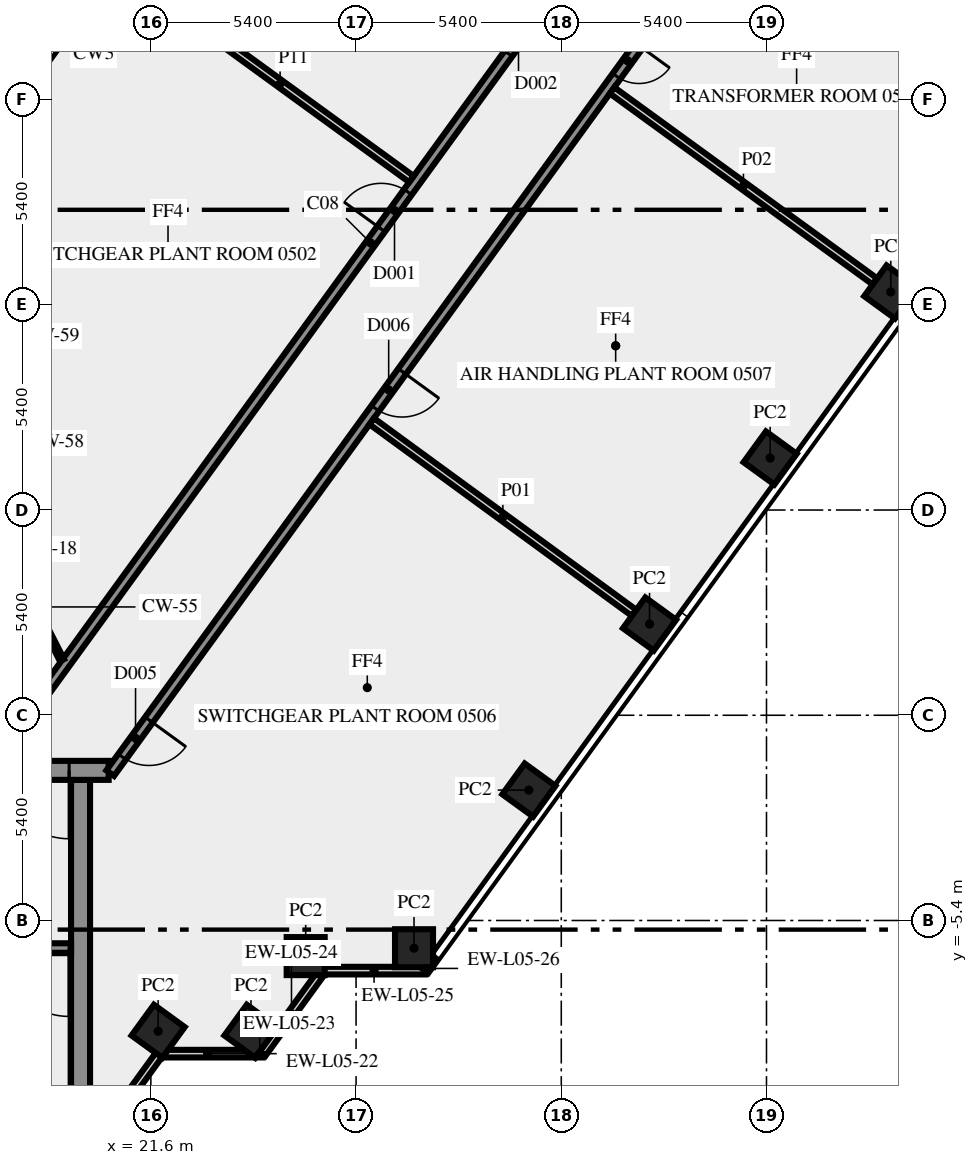
"""IFC4 building model, lengths in metres.
Left out: names, types, materials, properties, quantities, classifications, styles, units other than length and angle.
Written with IfcOpenShell. Run it as: python <this file> out.ifc"""

import sys

from ifc_helpers import new_model, si_unit, direction, frame, frame_2d, origin, origin_2d, place, context, subcontext, project, spatial, rectangle, extrude, element, fill, save


model = new_model("IFC4")
c1 = context("Model", 3, precision=1e-05, world=origin(), true_north=direction((0.0, 1.0)))
c2 = subcontext(c1, "Body", "Model", "MODEL_VIEW")
j1 = project(units=[si_unit("LENGTHUNIT", "METRE"), si_unit("PLANEANGLEUNIT", "RADIAN")], contexts=[c1])
p1 = place(None, origin())
s1 = spatial("IfcSite", under=j1, at=p1, CompositionType="ELEMENT")
p2 = place(p1, origin())
s2 = spatial("IfcBuilding", under=s1, at=p2, CompositionType="ELEMENT")
p3 = place(p2, frame((0.0, 0.0, 25.0)))
s3 = spatial("IfcBuildingStorey", under=s2, at=p3, CompositionType="ELEMENT", Elevation=25.0)
for number, where, z_axis, x_axis in (
    (1, (21.792, -8.315, 0.0), (0.0, 0.0, 1.0), (0.588, 0.809, 0.0)),
    (2, (24.235, -8.315, 0.0), (0.0, 0.0, 1.0), (0.588, 0.809, 0.0)),
    (3, (25.674, -6.337, 0.0), (0.0, 0.0, 1.0), (1.0, 0.0, 0.0)),
    (4, (28.525, -6.13, 0.0), (0.0, 0.0, 1.0), (1.0, 0.0, 0.0)),
    (5, (31.548, -1.969, 0.0), (0.0, 0.0, 1.0), (0.588, 0.809, 0.0)),
    (6, (34.722, 2.4, 0.0), (0.0, 0.0, 1.0), (0.588, 0.809, 0.0)),
    (7, (37.896, 6.769, 0.0), (0.0, 0.0, 1.0), (0.588, 0.809, 0.0)),
    (8, (41.07, 11.137, 0.0), (0.0, 0.0, 1.0), (0.588, 0.809, 0.0)),
):
    element("IfcColumn", number, at=place(p3, frame(where, z_axis=z_axis, x_axis=x_axis)), inside=s3, PredefinedType="COLUMN", context=c2, shape_type="SweptSolid", body=[
        extrude(rectangle(XDim=1.0, YDim=1.0, at=origin_2d()), origin(), (0.0, 0.0, 1.0), 5.65),
    ])
p4 = place(p3, frame((20.253, -11.083, 0.0), z_axis=(0.0, 0.0, 1.0), x_axis=(0.587766567315, 0.809030569476, 0.0)))
e9 = element("IfcWall", 9, at=p4, inside=s3, PredefinedType="SOLIDWALL", context=c2, shape_type="SweptSolid", body=[
    extrude(rectangle(XDim=2.688, YDim=0.2, at=frame_2d((1.344, 0.0))), origin(), (0.0, 0.0, 1.0), 5.65),
])
p5 = place(p3, frame((21.943, -8.904, 0.0), z_axis=(0.0, 0.0, 1.0), x_axis=(1.0, 0.0, 0.0)))
e10 = element("IfcWall", 10, at=p5, inside=s3, PredefinedType="SOLIDWALL", context=c2, shape_type="SweptSolid", body=[
    extrude(rectangle(XDim=2.298, YDim=0.2, at=frame_2d((1.149, 0.0))), origin(), (0.0, 0.0, 1.0), 5.65),
])
p6 = place(p3, frame((24.387, -8.904, 0.0), z_axis=(0.0, 0.0, 1.0), x_axis=(1.0, 0.0, 0.0)))
e11 = element("IfcWall", 11, at=p6, inside=s3, PredefinedType="SOLIDWALL", context=c2, shape_type="SweptSolid", body=[
    extrude(rectangle(XDim=0.156, YDim=0.2, at=frame_2d((0.078, 0.0))), origin(), (0.0, 0.0, 1.0), 5.65),
])
p7 = place(p3, frame((24.54, -8.899, 0.0), z_axis=(0.0, 0.0, 1.0), x_axis=(0.587700286833, 0.809078718578, 0.0)))
e12 = element("IfcWall", 12, at=p7, inside=s3, PredefinedType="SOLIDWALL", context=c2, shape_type="SweptSolid", body=[
    extrude(rectangle(XDim=2.587, YDim=0.2, at=frame_2d((1.293, 0.0))), origin(), (0.0, 0.0, 1.0), 5.65),
])
p8 = place(p3, frame((26.13, -6.719, 0.0), z_axis=(0.0, 0.0, 1.0), x_axis=(1.0, 0.0, 0.0)))
e13 = element("IfcWall", 13, at=p8, inside=s3, PredefinedType="SOLIDWALL", context=c2, shape_type="SweptSolid", body=[
    extrude(rectangle(XDim=2.688, YDim=0.2, at=frame_2d((1.344, 0.0))), origin(), (0.0, 0.0, 1.0), 5.65),
])
p9 = place(p3, frame((28.82, -6.724, 0.0), z_axis=(0.0, 0.0, 1.0), x_axis=(0.588358759446, 0.808600006297, 0.0)))
e14 = element("IfcWall", 14, at=p9, inside=s3, PredefinedType="SOLIDWALL", context=c2, shape_type="SweptSolid", body=[
    extrude(rectangle(XDim=0.155, YDim=0.2, at=frame_2d((0.078, 0.0))), origin(), (0.0, 0.0, 1.0), 5.65),
])
p10 = place(p3, frame((28.998, -6.48, 0.0), z_axis=(0.0, 0.0, 1.0), x_axis=(0.587784449244, 0.809017577823, 0.0)))
e15 = element("IfcWall", 15, at=p10, inside=s3, PredefinedType="SOLIDWALL", context=c2, shape_type="SweptSolid", body=[
    extrude(rectangle(XDim=44.654, YDim=0.2, at=frame_2d((22.327, 0.0))), origin(), (0.0, 0.0, 1.0), 5.65),
])
p11 = place(p3, frame((37.304, 42.68, 0.0), z_axis=(0.0, 0.0, 1.0), x_axis=(-0.587787194805, -0.809015583054, 0.0)))
e16 = element("IfcWall", 16, at=p11, inside=s3, PredefinedType="SOLIDWALL", context=c2, shape_type="SweptSolid", body=[
    extrude(rectangle(XDim=39.044, YDim=0.2, at=frame_2d((19.522, 0.0))), origin(), (0.0, 0.0, 1.0), 5.65),
])
p12 = place(p3, frame((19.75, -10.5, 0.0), z_axis=(0.0, 0.0, 1.0), x_axis=(0.0, 1.0, 0.0)))
e17 = element("IfcWall", 17, at=p12, inside=s3, PredefinedType="SHEAR", context=c2, shape_type="SweptSolid", body=[
    extrude(rectangle(XDim=8.8, YDim=0.5, at=frame_2d((4.4, 0.0))), origin(), (0.0, 0.0, 1.0), 5.65),
])
p13 = place(p3, frame((19.5, -6.125, 0.0), z_axis=(0.0, 0.0, 1.0), x_axis=(-1.0, 0.0, 0.0)))
e18 = element("IfcWall", 18, at=p13, inside=s3, PredefinedType="SHEAR", context=c2, shape_type="SweptSolid", body=[
    extrude(rectangle(XDim=8.05, YDim=0.25, at=frame_2d((4.025, 0.0))), origin(), (0.0, 0.0, 1.0), 5.65),
])
p14 = place(p13, frame((0.05, 0.0, 0.0)))
e19 = element("IfcOpeningElement", 19, at=p14, cuts=e18, PredefinedType="OPENING", context=c2, shape_type="SweptSolid", body=[
    extrude(rectangle(XDim=1.8, YDim=2.1, at=frame_2d((0.9, 1.05))), frame((0.0, 0.135, 0.0), z_axis=(0.0, -1.0, 0.0), x_axis=(1.0, 0.0, 0.0)), (0.0, 0.0, 1.0), 0.27),
])
p15 = place(p3, frame((20.49, -1.45, 0.0), z_axis=(0.0, 0.0, 1.0), x_axis=(-1.0, 0.0, 0.0)))
e20 = element("IfcWall", 20, at=p15, inside=s3, PredefinedType="SHEAR", context=c2, shape_type="SweptSolid", body=[
    extrude(rectangle(XDim=40.98, YDim=0.5, at=frame_2d((20.49, 0.0))), origin(), (0.0, 0.0, 1.0), 5.65),
])
p16 = place(p15, frame((38.14, 0.0, 0.0)))
e21 = element("IfcOpeningElement", 21, at=p16, cuts=e20, PredefinedType="OPENING", context=c2, shape_type="SweptSolid", body=[
    extrude(rectangle(XDim=1.8, YDim=2.1, at=frame_2d((0.9, 1.05))), frame((0.0, 0.26, 0.0), z_axis=(0.0, -1.0, 0.0), x_axis=(1.0, 0.0, 0.0)), (0.0, 0.0, 1.0), 0.52),
])
p17 = place(p15, frame((35.89, 0.0, 0.0)))
e22 = element("IfcOpeningElement", 22, at=p17, cuts=e20, PredefinedType="OPENING", context=c2, shape_type="SweptSolid", body=[
    extrude(rectangle(XDim=0.9, YDim=2.1, at=frame_2d((0.45, 1.05))), frame((0.0, 0.26, 0.0), z_axis=(0.0, -1.0, 0.0), x_axis=(1.0, 0.0, 0.0)), (0.0, 0.0, 1.0), 0.52),
])
p18 = place(p15, frame((32.94, 0.0, 0.0)))
e23 = element("IfcOpeningElement", 23, at=p18, cuts=e20, PredefinedType="OPENING", context=c2, shape_type="SweptSolid", body=[
    extrude(rectangle(XDim=0.9, YDim=2.1, at=frame_2d((0.45, 1.05))), frame((0.0, 0.26, 0.0), z_axis=(0.0, -1.0, 0.0), x_axis=(1.0, 0.0, 0.0)), (0.0, 0.0, 1.0), 0.52),
])
p19 = place(p15, frame((19.59, 0.0, 0.0)))
e24 = element("IfcOpeningElement", 24, at=p19, cuts=e20, PredefinedType="OPENING", context=c2, shape_type="SweptSolid", body=[
    extrude(rectangle(XDim=2.0, YDim=2.1, at=frame_2d((1.0, 1.05))), frame((0.0, 0.26, 0.0), z_axis=(0.0, -1.0, 0.0), x_axis=(1.0, 0.0, 0.0)), (0.0, 0.0, 1.0), 0.52),
])
p20 = place(p15, frame((7.14, 0.0, 0.0)))
e25 = element("IfcOpeningElement", 25, at=p20, cuts=e20, PredefinedType="OPENING", context=c2, shape_type="SweptSolid", body=[
    extrude(rectangle(XDim=0.9, YDim=2.1, at=frame_2d((0.45, 1.05))), frame((0.0, 0.26, 0.0), z_axis=(0.0, -1.0, 0.0), x_axis=(1.0, 0.0, 0.0)), (0.0, 0.0, 1.0), 0.52),
])
p21 = place(p15, frame((5.028, 0.0, 0.0)))
e26 = element("IfcOpeningElement", 26, at=p21, cuts=e20, PredefinedType="OPENING", context=c2, shape_type="SweptSolid", body=[
    extrude(rectangle(XDim=0.8, YDim=2.1, at=frame_2d((0.4, 1.05))), frame((0.0, 0.26, 0.0), z_axis=(0.0, -1.0, 0.0), x_axis=(1.0, 0.0, 0.0)), (0.0, 0.0, 1.0), 0.52),
])
p22 = place(p15, frame((3.452, 0.0, 0.0)))
e27 = element("IfcOpeningElement", 27, at=p22, cuts=e20, PredefinedType="OPENING", context=c2, shape_type="SweptSolid", body=[
    extrude(rectangle(XDim=0.8, YDim=2.1, at=frame_2d((0.4, 1.05))), frame((0.0, 0.26, 0.0), z_axis=(0.0, -1.0, 0.0), x_axis=(1.0, 0.0, 0.0)), (0.0, 0.0, 1.0), 0.52),
])
p23 = place(p15, frame((1.04, 0.0, 0.0)))
e28 = element("IfcOpeningElement", 28, at=p23, cuts=e20, PredefinedType="OPENING", context=c2, shape_type="SweptSolid", body=[
    extrude(rectangle(XDim=1.8, YDim=2.1, at=frame_2d((0.9, 1.05))), frame((0.0, 0.26, 0.0), z_axis=(0.0, -1.0, 0.0), x_axis=(1.0, 0.0, 0.0)), (0.0, 0.0, 1.0), 0.52),
])
p24 = place(p3, frame((49.989, 39.022, 0.0), z_axis=(0.0, 0.0, 1.0), x_axis=(-0.587782625701, -0.809018902699, 0.0)))
e29 = element("IfcWall", 29, at=p24, inside=s3, PredefinedType="SOLIDWALL", context=c2, shape_type="SweptSolid", body=[
    extrude(rectangle(XDim=50.117, YDim=0.25, at=frame_2d((25.058, 0.0))), origin(), (0.0, 0.0, 1.0), 5.65),
])
p25 = place(p24, frame((37.051, 0.0, 0.0)))
e30 = element("IfcOpeningElement", 30, at=p25, cuts=e29, PredefinedType="OPENING", context=c2, shape_type="SweptSolid", body=[
    extrude(rectangle(XDim=1.2, YDim=2.1, at=frame_2d((0.6, 1.05))), frame((0.0, 0.135, 0.0), z_axis=(0.0, -1.0, 0.0), x_axis=(1.0, 0.0, 0.0)), (0.0, 0.0, 1.0), 0.27),
])
p26 = place(p24, frame((20.851, 0.0, 0.0)))
e31 = element("IfcOpeningElement", 31, at=p26, cuts=e29, PredefinedType="OPENING", context=c2, shape_type="SweptSolid", body=[
    extrude(rectangle(XDim=1.2, YDim=2.1, at=frame_2d((0.6, 1.05))), frame((0.0, 0.135, 0.0), z_axis=(0.0, -1.0, 0.0), x_axis=(1.0, 0.0, 0.0)), (0.0, 0.0, 1.0), 0.27),
])
p27 = place(p24, frame((48.384, 0.0, 0.0)))
e32 = element("IfcOpeningElement", 32, at=p27, cuts=e29, PredefinedType="OPENING", context=c2, shape_type="SweptSolid", body=[
    extrude(rectangle(XDim=1.2, YDim=2.1, at=frame_2d((0.6, 1.05))), frame((0.0, 0.135, 0.0), z_axis=(0.0, -1.0, 0.0), x_axis=(1.0, 0.0, 0.0)), (0.0, 0.0, 1.0), 0.27),
])
p28 = place(p24, frame((26.45, 0.0, 0.0)))
e33 = element("IfcOpeningElement", 33, at=p28, cuts=e29, PredefinedType="OPENING", context=c2, shape_type="SweptSolid", body=[
    extrude(rectangle(XDim=1.0, YDim=2.1, at=frame_2d((0.5, 1.05))), frame((0.0, 0.135, 0.0), z_axis=(0.0, -1.0, 0.0), x_axis=(1.0, 0.0, 0.0)), (0.0, 0.0, 1.0), 0.27),
])
p29 = place(p3, frame((17.545, -1.125, 0.0), z_axis=(0.0, 0.0, 1.0), x_axis=(0.587786323093, 0.809016216391, 0.0)))
e34 = element("IfcWall", 34, at=p29, inside=s3, PredefinedType="SOLIDWALL", context=c2, shape_type="SweptSolid", body=[
    extrude(rectangle(XDim=33.493, YDim=0.25, at=frame_2d((16.747, 0.0))), origin(), (0.0, 0.0, 1.0), 5.65),
])
p30 = place(p29, frame((24.508, 0.0, 0.0)))
e35 = element("IfcOpeningElement", 35, at=p30, cuts=e34, PredefinedType="OPENING", context=c2, shape_type="SweptSolid", body=[
    extrude(rectangle(XDim=1.2, YDim=2.1, at=frame_2d((0.6, 1.05))), frame((0.0, 0.135, 0.0), z_axis=(0.0, -1.0, 0.0), x_axis=(1.0, 0.0, 0.0)), (0.0, 0.0, 1.0), 0.27),
])
p31 = place(p29, frame((17.207, 0.0, 0.0)))
e36 = element("IfcOpeningElement", 36, at=p31, cuts=e34, PredefinedType="OPENING", context=c2, shape_type="SweptSolid", body=[
    extrude(rectangle(XDim=1.2, YDim=2.1, at=frame_2d((0.6, 1.05))), frame((0.0, 0.135, 0.0), z_axis=(0.0, -1.0, 0.0), x_axis=(1.0, 0.0, 0.0)), (0.0, 0.0, 1.0), 0.27),
])
p32 = place(p29, frame((22.908, 0.0, 0.0)))
e37 = element("IfcOpeningElement", 37, at=p32, cuts=e34, PredefinedType="OPENING", context=c2, shape_type="SweptSolid", body=[
    extrude(rectangle(XDim=0.9, YDim=2.1, at=frame_2d((0.45, 1.05))), frame((0.0, 0.135, 0.0), z_axis=(0.0, -1.0, 0.0), x_axis=(1.0, 0.0, 0.0)), (0.0, 0.0, 1.0), 0.27),
])
p33 = place(p3, frame((27.413, 7.735, 0.0), z_axis=(0.0, 0.0, 1.0), x_axis=(0.80756437274, -0.589779436639, 0.0)))
e38 = element("IfcWall", 38, at=p33, inside=s3, PredefinedType="SOLIDWALL", context=c2, shape_type="SweptSolid", body=[
    extrude(rectangle(XDim=8.544, YDim=0.2, at=frame_2d((4.272, 0.0))), origin(), (0.0, 0.0, 1.0), 5.65),
])
for number, where, z_axis, x_axis in (
    (39, (40.65, 11.418, 0.0), (0.0, 0.0, 1.0), (-0.809, 0.588, 0.0)),
    (40, (36.935, 20.842, 0.0), (0.0, 0.0, 1.0), (0.808, -0.59, 0.0)),
):
    element("IfcWall", number, at=place(p3, frame(where, z_axis=z_axis, x_axis=x_axis)), inside=s3, PredefinedType="SOLIDWALL", context=c2, shape_type="SweptSolid", body=[
        extrude(rectangle(XDim=8.545, YDim=0.2, at=frame_2d((4.272, 0.0))), origin(), (0.0, 0.0, 1.0), 5.65),
    ])
p34 = place(p3, frame((28.457, 14.108, 0.0), z_axis=(0.0, 0.0, 1.0), x_axis=(-0.808976936231, 0.587840383647, 0.0)))
e41 = element("IfcWall", 41, at=p34, inside=s3, PredefinedType="SOLIDWALL", context=c2, shape_type="SweptSolid", body=[
    extrude(rectangle(XDim=8.545, YDim=0.2, at=frame_2d((4.272, 0.0))), origin(), (0.0, 0.0, 1.0), 5.65),
])
p35 = place(p3, frame((18.0, 3.925, 0.0), z_axis=(0.0, 0.0, 1.0), x_axis=(0.453950796792, -0.891026752736, 0.0)))
e42 = element("IfcWall", 42, at=p35, inside=s3, PredefinedType="PARTITIONING", context=c2, shape_type="SweptSolid", body=[
    extrude(rectangle(XDim=2.778, YDim=0.12, at=frame_2d((1.389, 0.0))), origin(), (0.0, 0.0, 1.0), 5.65),
])
p36 = place(p14, origin())
e43 = element("IfcDoor", 43, at=p36, inside=s3, OperationType="DOUBLE_DOOR_SINGLE_SWING", PredefinedType="DOOR", context=c2, shape_type="SweptSolid", body=[
    extrude(rectangle(XDim=1.8, YDim=2.1, at=frame_2d((0.9, 1.05))), frame((0.0, 0.025, 0.0), z_axis=(0.0, -1.0, 0.0), x_axis=(1.0, 0.0, 0.0)), (0.0, 0.0, 1.0), 0.05),
])
fill(e19, e43)
p37 = place(p23, origin())
e44 = element("IfcDoor", 44, at=p37, inside=s3, OperationType="DOUBLE_DOOR_SINGLE_SWING", PredefinedType="DOOR", context=c2, shape_type="SweptSolid", body=[
    extrude(rectangle(XDim=1.8, YDim=2.1, at=frame_2d((0.9, 1.05))), frame((0.0, 0.025, 0.0), z_axis=(0.0, -1.0, 0.0), x_axis=(1.0, 0.0, 0.0)), (0.0, 0.0, 1.0), 0.05),
])
fill(e28, e44)
p38 = place(p25, origin())
e45 = element("IfcDoor", 45, at=p38, inside=s3, OperationType="SINGLE_SWING_RIGHT", PredefinedType="DOOR", context=c2, shape_type="SweptSolid", body=[
    extrude(rectangle(XDim=1.2, YDim=2.1, at=frame_2d((0.6, 1.05))), frame((0.0, 0.025, 0.0), z_axis=(0.0, -1.0, 0.0), x_axis=(1.0, 0.0, 0.0)), (0.0, 0.0, 1.0), 0.05),
])
fill(e30, e45)
p39 = place(p31, origin())
e46 = element("IfcDoor", 46, at=p39, inside=s3, OperationType="SINGLE_SWING_RIGHT", PredefinedType="DOOR", context=c2, shape_type="SweptSolid", body=[
    extrude(rectangle(XDim=1.2, YDim=2.1, at=frame_2d((0.6, 1.05))), frame((0.0, 0.025, 0.0), z_axis=(0.0, -1.0, 0.0), x_axis=(1.0, 0.0, 0.0)), (0.0, 0.0, 1.0), 0.05),
])
fill(e36, e46)
p40 = place(p27, origin())
e47 = element("IfcDoor", 47, at=p40, inside=s3, OperationType="SINGLE_SWING_RIGHT", PredefinedType="DOOR", context=c2, shape_type="SweptSolid", body=[
    extrude(rectangle(XDim=1.2, YDim=2.1, at=frame_2d((0.6, 1.05))), frame((0.0, 0.025, 0.0), z_axis=(0.0, -1.0, 0.0), x_axis=(1.0, 0.0, 0.0)), (0.0, 0.0, 1.0), 0.05),
])
fill(e32, e47)
p41 = place(p28, origin())
e48 = element("IfcDoor", 48, at=p41, inside=s3, OperationType="SINGLE_SWING_RIGHT", PredefinedType="DOOR", context=c2, shape_type="SweptSolid", body=[
    extrude(rectangle(XDim=1.0, YDim=2.1, at=frame_2d((0.5, 1.05))), frame((0.0, 0.025, 0.0), z_axis=(0.0, -1.0, 0.0), x_axis=(1.0, 0.0, 0.0)), (0.0, 0.0, 1.0), 0.05),
])
fill(e33, e48)
p42 = place(p32, origin())
e49 = element("IfcDoor", 49, at=p42, inside=s3, OperationType="SINGLE_SWING_RIGHT", PredefinedType="DOOR", context=c2, shape_type="SweptSolid", body=[
    extrude(rectangle(XDim=0.9, YDim=2.1, at=frame_2d((0.45, 1.05))), frame((0.0, 0.025, 0.0), z_axis=(0.0, -1.0, 0.0), x_axis=(1.0, 0.0, 0.0)), (0.0, 0.0, 1.0), 0.05),
])
fill(e37, e49)
save(model, sys.argv[1])
